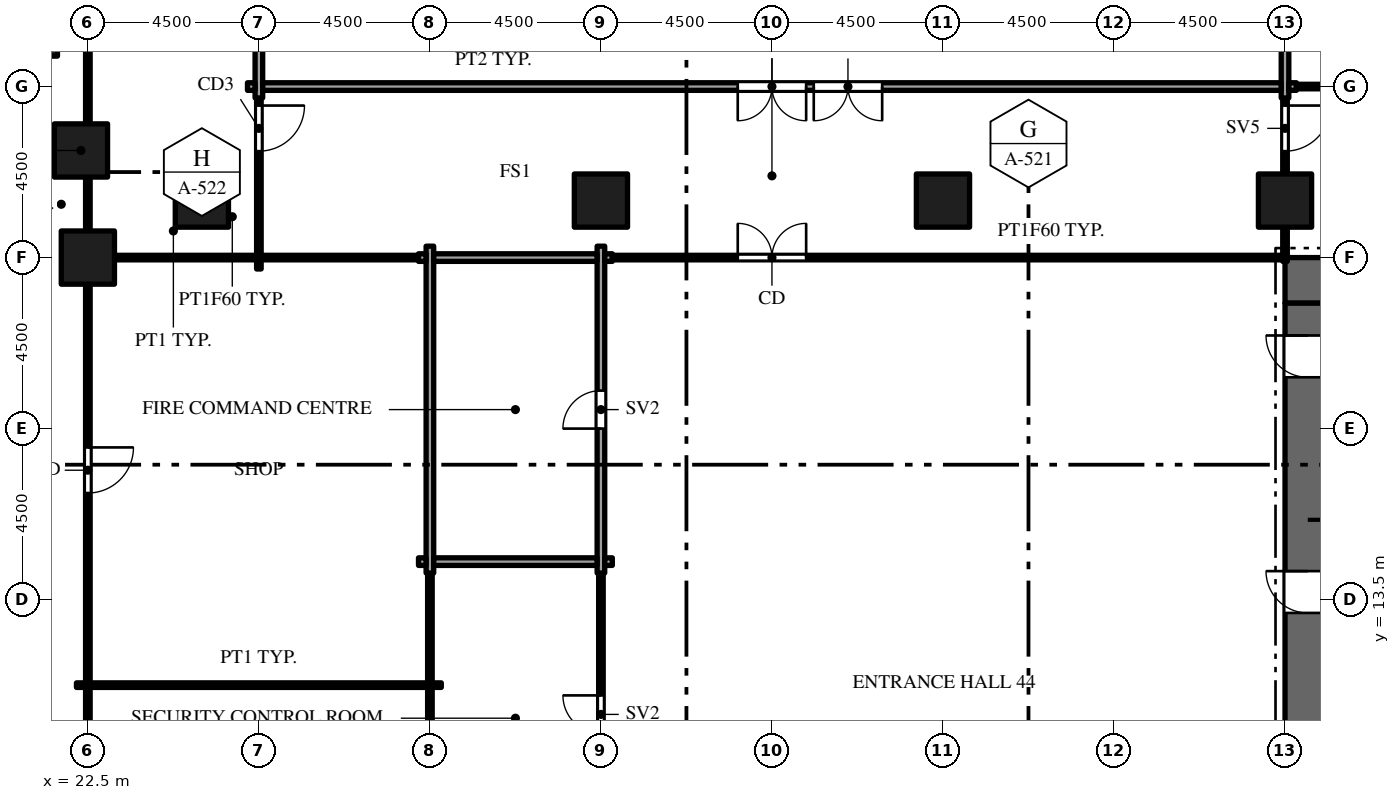
"""IFC4 building model, lengths in metres.
Left out: names, types, materials, properties, quantities, classifications, styles, units other than length and angle.
Written with IfcOpenShell. Run it as: python <this file> out.ifc"""

import sys

from ifc_helpers import new_model, si_unit, direction, frame, frame_2d, origin, origin_2d, place, context, subcontext, project, spatial, rectangle, hollow_rectangle, extrude, element, fill, save


model = new_model("IFC4")
c1 = context("Model", 3, precision=1e-05, world=origin(), true_north=direction((0.0, 1.0)))
c2 = subcontext(c1, "Body", "Model", "MODEL_VIEW")
j1 = project(units=[si_unit("LENGTHUNIT", "METRE"), si_unit("PLANEANGLEUNIT", "RADIAN")], contexts=[c1])
p1 = place(None, origin())
s1 = spatial("IfcSite", under=j1, at=p1, CompositionType="ELEMENT")
p2 = place(p1, origin())
s2 = spatial("IfcBuilding", under=s1, at=p2, CompositionType="ELEMENT")
p3 = place(p2, origin())
s3 = spatial("IfcBuildingStorey", under=s2, at=p3, CompositionType="ELEMENT", Elevation=0.0)
p4 = place(p3, frame((54.0, 21.9, -0.3), z_axis=(0.0, 0.0, 1.0), x_axis=(1.0, 0.0, 0.0)))
e1 = element("IfcWall", 1, at=p4, inside=s3, PredefinedType="SHEAR", context=c2, shape_type="SweptSolid", body=[
    extrude(rectangle(XDim=13.5, YDim=1.2, at=frame_2d((6.75, 0.0))), origin(), (0.0, 0.0, 1.0), 8.15),
])
p5 = place(p3, frame((54.6, 1.2, -0.3), z_axis=(0.0, 0.0, 1.0), x_axis=(0.0, 1.0, 0.0)))
e2 = element("IfcWall", 2, at=p5, inside=s3, PredefinedType="SHEAR", context=c2, shape_type="SweptSolid", body=[
    extrude(rectangle(XDim=20.1, YDim=1.2, at=frame_2d((10.05, 0.0))), origin(), (0.0, 0.0, 1.0), 8.15),
])
p6 = place(p5, frame((5.9, 0.0, 0.3)))
e3 = element("IfcOpeningElement", 3, at=p6, cuts=e2, PredefinedType="OPENING", context=c2, shape_type="SweptSolid", body=[
    extrude(rectangle(XDim=1.8, YDim=2.1, at=frame_2d((0.9, 1.05))), frame((0.0, 0.61, 0.0), z_axis=(0.0, -1.0, 0.0), x_axis=(1.0, 0.0, 0.0)), (0.0, 0.0, 1.0), 1.22),
])
p7 = place(p5, frame((11.95, 0.0, 0.3)))
e4 = element("IfcOpeningElement", 4, at=p7, cuts=e2, PredefinedType="OPENING", context=c2, shape_type="SweptSolid", body=[
    extrude(rectangle(XDim=1.1, YDim=2.1, at=frame_2d((0.55, 1.05))), frame((0.0, 0.61, 0.0), z_axis=(0.0, -1.0, 0.0), x_axis=(1.0, 0.0, 0.0)), (0.0, 0.0, 1.0), 1.22),
])
p8 = place(p5, frame((0.95, 0.0, 0.3)))
e5 = element("IfcOpeningElement", 5, at=p8, cuts=e2, PredefinedType="OPENING", context=c2, shape_type="SweptSolid", body=[
    extrude(rectangle(XDim=1.1, YDim=2.1, at=frame_2d((0.55, 1.05))), frame((0.0, 0.61, 0.0), z_axis=(0.0, -1.0, 0.0), x_axis=(1.0, 0.0, 0.0)), (0.0, 0.0, 1.0), 1.22),
])
p9 = place(p5, frame((18.15, 0.0, 0.3)))
e6 = element("IfcOpeningElement", 6, at=p9, cuts=e2, PredefinedType="OPENING", context=c2, shape_type="SweptSolid", body=[
    extrude(rectangle(XDim=1.1, YDim=2.1, at=frame_2d((0.55, 1.05))), frame((0.0, 0.61, 0.0), z_axis=(0.0, -1.0, 0.0), x_axis=(1.0, 0.0, 0.0)), (0.0, 0.0, 1.0), 1.22),
])
for number, where, z_axis, x_axis in (
    (7, (21.0, 28.5, -0.3), (0.0, 0.0, 1.0), (1.0, 0.0, 0.0)),
    (8, (22.318, 25.318, -0.3), (0.0, 0.0, 1.0), (1.0, 0.0, 0.0)),
    (9, (22.5, 22.5, -0.3), (0.0, 0.0, 1.0), (1.0, 0.0, 0.0)),
    (10, (25.5, 24.0, -0.3), (0.0, 0.0, 1.0), (1.0, 0.0, 0.0)),
    (11, (36.0, 24.0, -0.3), (0.0, 0.0, 1.0), (1.0, 0.0, 0.0)),
    (12, (45.0, 24.0, -0.3), (0.0, 0.0, 1.0), (1.0, 0.0, 0.0)),
    (13, (54.0, 24.0, -0.3), (0.0, 0.0, 1.0), (1.0, 0.0, 0.0)),
):
    element("IfcColumn", number, at=place(p3, frame(where, z_axis=z_axis, x_axis=x_axis)), inside=s3, PredefinedType="COLUMN", context=c2, shape_type="SweptSolid", body=[
        extrude(hollow_rectangle(XDim=1.4, YDim=1.4, WallThickness=0.08, at=origin_2d()), origin(), (0.0, 0.0, 1.0), 8.05),
    ])
p10 = place(p3, frame((22.5, 0.15, 0.0), z_axis=(0.0, 0.0, 1.0), x_axis=(0.0, 1.0, 0.0)))
e14 = element("IfcWall", 14, at=p10, inside=s3, PredefinedType="PARTITIONING", context=c2, shape_type="SweptSolid", body=[
    extrude(rectangle(XDim=32.85, YDim=0.12, at=frame_2d((16.425, 0.0))), origin(), (0.0, 0.0, 1.0), 6.759),
])
p11 = place(p10, frame((5.35, 0.0, 0.0)))
e15 = element("IfcOpeningElement", 15, at=p11, cuts=e14, PredefinedType="OPENING", context=c2, shape_type="SweptSolid", body=[
    extrude(rectangle(XDim=1.2, YDim=2.1, at=frame_2d((0.6, 1.05))), frame((0.0, 0.07, 0.0), z_axis=(0.0, -1.0, 0.0), x_axis=(1.0, 0.0, 0.0)), (0.0, 0.0, 1.0), 0.14),
])
p12 = place(p10, frame((16.155, 0.0, 0.0)))
e16 = element("IfcOpeningElement", 16, at=p12, cuts=e14, PredefinedType="OPENING", context=c2, shape_type="SweptSolid", body=[
    extrude(rectangle(XDim=1.2, YDim=2.1, at=frame_2d((0.6, 1.05))), frame((0.0, 0.07, 0.0), z_axis=(0.0, -1.0, 0.0), x_axis=(1.0, 0.0, 0.0)), (0.0, 0.0, 1.0), 0.14),
])
p13 = place(p10, frame((30.15, 0.0, 0.0)))
e17 = element("IfcOpeningElement", 17, at=p13, cuts=e14, PredefinedType="OPENING", context=c2, shape_type="SweptSolid", body=[
    extrude(rectangle(XDim=1.8, YDim=2.1, at=frame_2d((0.9, 1.05))), frame((0.0, 0.07, 0.0), z_axis=(0.0, -1.0, 0.0), x_axis=(1.0, 0.0, 0.0)), (0.0, 0.0, 1.0), 0.14),
])
p14 = place(p3, frame((27.0, 22.2, 0.0), z_axis=(0.0, 0.0, 1.0), x_axis=(0.0, 1.0, 0.0)))
e18 = element("IfcWall", 18, at=p14, inside=s3, PredefinedType="PARTITIONING", context=c2, shape_type="SweptSolid", body=[
    extrude(rectangle(XDim=4.5, YDim=0.12, at=frame_2d((2.25, 0.0))), origin(), (0.0, 0.0, 1.0), 6.5),
])
p15 = place(p14, frame((3.1, 0.0, 0.0)))
e19 = element("IfcOpeningElement", 19, at=p15, cuts=e18, PredefinedType="OPENING", context=c2, shape_type="SweptSolid", body=[
    extrude(rectangle(XDim=1.2, YDim=2.1, at=frame_2d((0.6, 1.05))), frame((0.0, 0.07, 0.0), z_axis=(0.0, -1.0, 0.0), x_axis=(1.0, 0.0, 0.0)), (0.0, 0.0, 1.0), 0.14),
])
p16 = place(p3, frame((27.0, 26.7, 0.0), z_axis=(0.0, 0.0, 1.0), x_axis=(0.0, 1.0, 0.0)))
e20 = element("IfcWall", 20, at=p16, inside=s3, PredefinedType="PARTITIONING", context=c2, shape_type="SweptSolid", body=[
    extrude(rectangle(XDim=17.1, YDim=0.2, at=frame_2d((8.55, 0.0))), origin(), (0.0, 0.0, 1.0), 6.66),
])
p17 = place(p3, frame((31.5, 0.15, 0.0), z_axis=(0.0, 0.0, 1.0), x_axis=(0.0, 1.0, 0.0)))
e21 = element("IfcWall", 21, at=p17, inside=s3, PredefinedType="PARTITIONING", context=c2, shape_type="SweptSolid", body=[
    extrude(rectangle(XDim=14.05, YDim=0.12, at=frame_2d((7.025, 0.0))), origin(), (0.0, 0.0, 1.0), 6.759),
])
p18 = place(p3, frame((31.5, 14.2, 0.0), z_axis=(0.0, 0.0, 1.0), x_axis=(0.0, 1.0, 0.0)))
e22 = element("IfcWall", 22, at=p18, inside=s3, PredefinedType="PARTITIONING", context=c2, shape_type="SweptSolid", body=[
    extrude(rectangle(XDim=8.6, YDim=0.2, at=frame_2d((4.3, 0.0))), origin(), (0.0, 0.0, 1.0), 6.759),
])
p19 = place(p3, frame((36.0, 0.15, 0.0), z_axis=(0.0, 0.0, 1.0), x_axis=(0.0, 1.0, 0.0)))
e23 = element("IfcWall", 23, at=p19, inside=s3, PredefinedType="PARTITIONING", context=c2, shape_type="SweptSolid", body=[
    extrude(rectangle(XDim=14.05, YDim=0.12, at=frame_2d((7.025, 0.0))), origin(), (0.0, 0.0, 1.0), 6.759),
])
p20 = place(p19, frame((9.83, 0.0, 0.0)))
e24 = element("IfcOpeningElement", 24, at=p20, cuts=e23, PredefinedType="OPENING", context=c2, shape_type="SweptSolid", body=[
    extrude(rectangle(XDim=1.0, YDim=2.1, at=frame_2d((0.5, 1.05))), frame((0.0, 0.07, 0.0), z_axis=(0.0, -1.0, 0.0), x_axis=(1.0, 0.0, 0.0)), (0.0, 0.0, 1.0), 0.14),
])
p21 = place(p19, frame((0.455, 0.0, 0.0)))
e25 = element("IfcOpeningElement", 25, at=p21, cuts=e23, PredefinedType="OPENING", context=c2, shape_type="SweptSolid", body=[
    extrude(rectangle(XDim=0.9, YDim=2.1, at=frame_2d((0.45, 1.05))), frame((0.0, 0.07, 0.0), z_axis=(0.0, -1.0, 0.0), x_axis=(1.0, 0.0, 0.0)), (0.0, 0.0, 1.0), 0.14),
])
p22 = place(p19, frame((2.4, 0.0, 0.0)))
e26 = element("IfcOpeningElement", 26, at=p22, cuts=e23, PredefinedType="OPENING", context=c2, shape_type="SweptSolid", body=[
    extrude(rectangle(XDim=0.9, YDim=2.1, at=frame_2d((0.45, 1.05))), frame((0.0, 0.07, 0.0), z_axis=(0.0, -1.0, 0.0), x_axis=(1.0, 0.0, 0.0)), (0.0, 0.0, 1.0), 0.14),
])
p23 = place(p19, frame((4.6, 0.0, 0.0)))
e27 = element("IfcOpeningElement", 27, at=p23, cuts=e23, PredefinedType="OPENING", context=c2, shape_type="SweptSolid", body=[
    extrude(rectangle(XDim=1.0, YDim=2.1, at=frame_2d((0.5, 1.05))), frame((0.0, 0.07, 0.0), z_axis=(0.0, -1.0, 0.0), x_axis=(1.0, 0.0, 0.0)), (0.0, 0.0, 1.0), 0.14),
])
p24 = place(p3, frame((36.0, 14.2, 0.0), z_axis=(0.0, 0.0, 1.0), x_axis=(0.0, 1.0, 0.0)))
e28 = element("IfcWall", 28, at=p24, inside=s3, PredefinedType="PARTITIONING", context=c2, shape_type="SweptSolid", body=[
    extrude(rectangle(XDim=8.6, YDim=0.2, at=frame_2d((4.3, 0.0))), origin(), (0.0, 0.0, 1.0), 6.759),
])
p25 = place(p24, frame((3.8, 0.0, 0.0)))
e29 = element("IfcOpeningElement", 29, at=p25, cuts=e28, PredefinedType="OPENING", context=c2, shape_type="SweptSolid", body=[
    extrude(rectangle(XDim=1.0, YDim=2.1, at=frame_2d((0.5, 1.05))), frame((0.0, 0.11, 0.0), z_axis=(0.0, -1.0, 0.0), x_axis=(1.0, 0.0, 0.0)), (0.0, 0.0, 1.0), 0.22),
])
p26 = place(p3, frame((54.0, 22.4, 0.0), z_axis=(0.0, 0.0, 1.0), x_axis=(0.0, 1.0, 0.0)))
e30 = element("IfcWall", 30, at=p26, inside=s3, PredefinedType="PARTITIONING", context=c2, shape_type="SweptSolid", body=[
    extrude(rectangle(XDim=4.3, YDim=0.12, at=frame_2d((2.15, 0.0))), origin(), (0.0, 0.0, 1.0), 6.66),
])
p27 = place(p26, frame((2.9, 0.0, 0.0)))
e31 = element("IfcOpeningElement", 31, at=p27, cuts=e30, PredefinedType="OPENING", context=c2, shape_type="SweptSolid", body=[
    extrude(rectangle(XDim=1.2, YDim=2.1, at=frame_2d((0.6, 1.05))), frame((0.0, 0.07, 0.0), z_axis=(0.0, -1.0, 0.0), x_axis=(1.0, 0.0, 0.0)), (0.0, 0.0, 1.0), 0.14),
])
p28 = place(p3, frame((54.0, 26.7, 0.0), z_axis=(0.0, 0.0, 1.0), x_axis=(0.0, 1.0, 0.0)))
e32 = element("IfcWall", 32, at=p28, inside=s3, PredefinedType="PARTITIONING", context=c2, shape_type="SweptSolid", body=[
    extrude(rectangle(XDim=17.1, YDim=0.2, at=frame_2d((8.55, 0.0))), origin(), (0.0, 0.0, 1.0), 6.66),
])
p29 = place(p28, frame((7.65, 0.0, 0.0)))
e33 = element("IfcOpeningElement", 33, at=p29, cuts=e32, PredefinedType="OPENING", context=c2, shape_type="SweptSolid", body=[
    extrude(rectangle(XDim=1.8, YDim=2.1, at=frame_2d((0.9, 1.05))), frame((0.0, 0.11, 0.0), z_axis=(0.0, -1.0, 0.0), x_axis=(1.0, 0.0, 0.0)), (0.0, 0.0, 1.0), 0.22),
])
p30 = place(p3, frame((22.2, 11.25, 0.0), z_axis=(0.0, 0.0, 1.0), x_axis=(1.0, 0.0, 0.0)))
e34 = element("IfcWall", 34, at=p30, inside=s3, PredefinedType="PARTITIONING", context=c2, shape_type="SweptSolid", body=[
    extrude(rectangle(XDim=0.24, YDim=0.12, at=frame_2d((0.12, 0.0))), origin(), (0.0, 0.0, 1.0), 6.759),
])
p31 = place(p3, frame((22.56, 11.25, 0.0), z_axis=(0.0, 0.0, 1.0), x_axis=(1.0, 0.0, 0.0)))
e35 = element("IfcWall", 35, at=p31, inside=s3, PredefinedType="PARTITIONING", context=c2, shape_type="SweptSolid", body=[
    extrude(rectangle(XDim=8.88, YDim=0.12, at=frame_2d((4.44, 0.0))), origin(), (0.0, 0.0, 1.0), 6.66),
])
p32 = place(p3, frame((31.56, 11.25, 0.0), z_axis=(0.0, 0.0, 1.0), x_axis=(1.0, 0.0, 0.0)))
e36 = element("IfcWall", 36, at=p32, inside=s3, PredefinedType="PARTITIONING", context=c2, shape_type="SweptSolid", body=[
    extrude(rectangle(XDim=0.24, YDim=0.12, at=frame_2d((0.12, 0.0))), origin(), (0.0, 0.0, 1.0), 6.759),
])
p33 = place(p3, frame((31.2, 14.5, 0.0), z_axis=(0.0, 0.0, 1.0), x_axis=(1.0, 0.0, 0.0)))
e37 = element("IfcWall", 37, at=p33, inside=s3, PredefinedType="PARTITIONING", context=c2, shape_type="SweptSolid", body=[
    extrude(rectangle(XDim=0.2, YDim=0.2, at=frame_2d((0.1, 0.0))), origin(), (0.0, 0.0, 1.0), 6.759),
])
p34 = place(p3, frame((31.6, 14.5, 0.0), z_axis=(0.0, 0.0, 1.0), x_axis=(1.0, 0.0, 0.0)))
e38 = element("IfcWall", 38, at=p34, inside=s3, PredefinedType="PARTITIONING", context=c2, shape_type="SweptSolid", body=[
    extrude(rectangle(XDim=4.3, YDim=0.2, at=frame_2d((2.15, 0.0))), origin(), (0.0, 0.0, 1.0), 6.66),
])
p35 = place(p3, frame((36.1, 14.5, 0.0), z_axis=(0.0, 0.0, 1.0), x_axis=(1.0, 0.0, 0.0)))
e39 = element("IfcWall", 39, at=p35, inside=s3, PredefinedType="PARTITIONING", context=c2, shape_type="SweptSolid", body=[
    extrude(rectangle(XDim=0.2, YDim=0.2, at=frame_2d((0.1, 0.0))), origin(), (0.0, 0.0, 1.0), 6.759),
])
p36 = place(p3, frame((22.2, 22.5, 0.0), z_axis=(0.0, 0.0, 1.0), x_axis=(1.0, 0.0, 0.0)))
e40 = element("IfcWall", 40, at=p36, inside=s3, PredefinedType="PARTITIONING", context=c2, shape_type="SweptSolid", body=[
    extrude(rectangle(XDim=0.24, YDim=0.12, at=frame_2d((0.12, 0.0))), origin(), (0.0, 0.0, 1.0), 7.75),
])
p37 = place(p3, frame((22.56, 22.5, 0.0), z_axis=(0.0, 0.0, 1.0), x_axis=(1.0, 0.0, 0.0)))
e41 = element("IfcWall", 41, at=p37, inside=s3, PredefinedType="PARTITIONING", context=c2, shape_type="SweptSolid", body=[
    extrude(rectangle(XDim=4.38, YDim=0.12, at=frame_2d((2.19, 0.0))), origin(), (0.0, 0.0, 1.0), 6.66),
])
p38 = place(p3, frame((27.06, 22.5, 0.0), z_axis=(0.0, 0.0, 1.0), x_axis=(1.0, 0.0, 0.0)))
e42 = element("IfcWall", 42, at=p38, inside=s3, PredefinedType="PARTITIONING", context=c2, shape_type="SweptSolid", body=[
    extrude(rectangle(XDim=4.14, YDim=0.12, at=frame_2d((2.07, 0.0))), origin(), (0.0, 0.0, 1.0), 6.66),
])
p39 = place(p3, frame((31.2, 22.5, 0.0), z_axis=(0.0, 0.0, 1.0), x_axis=(1.0, 0.0, 0.0)))
e43 = element("IfcWall", 43, at=p39, inside=s3, PredefinedType="PARTITIONING", context=c2, shape_type="SweptSolid", body=[
    extrude(rectangle(XDim=0.2, YDim=0.2, at=frame_2d((0.1, 0.0))), origin(), (0.0, 0.0, 1.0), 6.759),
])
p40 = place(p3, frame((31.6, 22.5, 0.0), z_axis=(0.0, 0.0, 1.0), x_axis=(1.0, 0.0, 0.0)))
e44 = element("IfcWall", 44, at=p40, inside=s3, PredefinedType="PARTITIONING", context=c2, shape_type="SweptSolid", body=[
    extrude(rectangle(XDim=4.3, YDim=0.2, at=frame_2d((2.15, 0.0))), origin(), (0.0, 0.0, 1.0), 6.66),
])
p41 = place(p3, frame((36.1, 22.5, 0.0), z_axis=(0.0, 0.0, 1.0), x_axis=(1.0, 0.0, 0.0)))
e45 = element("IfcWall", 45, at=p41, inside=s3, PredefinedType="PARTITIONING", context=c2, shape_type="SweptSolid", body=[
    extrude(rectangle(XDim=0.2, YDim=0.2, at=frame_2d((0.1, 0.0))), origin(), (0.0, 0.0, 1.0), 6.759),
])
p42 = place(p3, frame((36.3, 22.5, 0.0), z_axis=(0.0, 0.0, 1.0), x_axis=(1.0, 0.0, 0.0)))
e46 = element("IfcWall", 46, at=p42, inside=s3, PredefinedType="PARTITIONING", context=c2, shape_type="SweptSolid", body=[
    extrude(rectangle(XDim=17.64, YDim=0.12, at=frame_2d((8.82, 0.0))), origin(), (0.0, 0.0, 1.0), 6.66),
])
p43 = place(p42, frame((3.3, 0.0, 0.0)))
e47 = element("IfcOpeningElement", 47, at=p43, cuts=e46, PredefinedType="OPENING", context=c2, shape_type="SweptSolid", body=[
    extrude(rectangle(XDim=1.8, YDim=2.1, at=frame_2d((0.9, 1.05))), frame((0.0, 0.07, 0.0), z_axis=(0.0, -1.0, 0.0), x_axis=(1.0, 0.0, 0.0)), (0.0, 0.0, 1.0), 0.14),
])
p44 = place(p3, frame((26.7, 27.0, 0.0), z_axis=(0.0, 0.0, 1.0), x_axis=(1.0, 0.0, 0.0)))
e48 = element("IfcWall", 48, at=p44, inside=s3, PredefinedType="PARTITIONING", context=c2, shape_type="SweptSolid", body=[
    extrude(rectangle(XDim=0.2, YDim=0.2, at=frame_2d((0.1, 0.0))), origin(), (0.0, 0.0, 1.0), 6.66),
])
p45 = place(p3, frame((27.1, 27.0, 0.0), z_axis=(0.0, 0.0, 1.0), x_axis=(1.0, 0.0, 0.0)))
e49 = element("IfcWall", 49, at=p45, inside=s3, PredefinedType="PARTITIONING", context=c2, shape_type="SweptSolid", body=[
    extrude(rectangle(XDim=26.8, YDim=0.2, at=frame_2d((13.4, 0.0))), origin(), (0.0, 0.0, 1.0), 6.66),
])
p46 = place(p45, frame((12.5, 0.0, 0.0)))
e50 = element("IfcOpeningElement", 50, at=p46, cuts=e49, PredefinedType="OPENING", context=c2, shape_type="SweptSolid", body=[
    extrude(rectangle(XDim=1.8, YDim=2.1, at=frame_2d((0.9, 1.05))), frame((0.0, 0.11, 0.0), z_axis=(0.0, -1.0, 0.0), x_axis=(1.0, 0.0, 0.0)), (0.0, 0.0, 1.0), 0.22),
])
p47 = place(p45, frame((14.5, 0.0, 0.0)))
e51 = element("IfcOpeningElement", 51, at=p47, cuts=e49, PredefinedType="OPENING", context=c2, shape_type="SweptSolid", body=[
    extrude(rectangle(XDim=1.8, YDim=2.1, at=frame_2d((0.9, 1.05))), frame((0.0, 0.11, 0.0), z_axis=(0.0, -1.0, 0.0), x_axis=(1.0, 0.0, 0.0)), (0.0, 0.0, 1.0), 0.22),
])
p48 = place(p3, frame((54.1, 27.0, 0.0), z_axis=(0.0, 0.0, 1.0), x_axis=(1.0, 0.0, 0.0)))
e52 = element("IfcWall", 52, at=p48, inside=s3, PredefinedType="PARTITIONING", context=c2, shape_type="SweptSolid", body=[
    extrude(rectangle(XDim=0.2, YDim=0.2, at=frame_2d((0.1, 0.0))), origin(), (0.0, 0.0, 1.0), 6.66),
])
p49 = place(p3, frame((54.3, 27.0, 0.0), z_axis=(0.0, 0.0, 1.0), x_axis=(1.0, 0.0, 0.0)))
e53 = element("IfcWall", 53, at=p49, inside=s3, PredefinedType="PARTITIONING", context=c2, shape_type="SweptSolid", body=[
    extrude(rectangle(XDim=13.05, YDim=0.12, at=frame_2d((6.525, 0.0))), origin(), (0.0, 0.0, 1.0), 6.66),
])
p50 = place(p49, frame((5.795, 0.0, 0.0)))
e54 = element("IfcOpeningElement", 54, at=p50, cuts=e53, PredefinedType="OPENING", context=c2, shape_type="SweptSolid", body=[
    extrude(rectangle(XDim=1.2, YDim=2.1, at=frame_2d((0.6, 1.05))), frame((0.0, 0.07, 0.0), z_axis=(0.0, -1.0, 0.0), x_axis=(1.0, 0.0, 0.0)), (0.0, 0.0, 1.0), 0.14),
])
p51 = place(p7, origin())
e55 = element("IfcDoor", 55, at=p51, inside=s3, OperationType="SINGLE_SWING_RIGHT", PredefinedType="DOOR", context=c2, shape_type="SweptSolid", body=[
    extrude(rectangle(XDim=1.1, YDim=2.1, at=frame_2d((0.55, 1.05))), frame((0.0, 0.025, 0.0), z_axis=(0.0, -1.0, 0.0), x_axis=(1.0, 0.0, 0.0)), (0.0, 0.0, 1.0), 0.05),
])
fill(e4, e55)
p52 = place(p9, origin())
e56 = element("IfcDoor", 56, at=p52, inside=s3, OperationType="SINGLE_SWING_RIGHT", PredefinedType="DOOR", context=c2, shape_type="SweptSolid", body=[
    extrude(rectangle(XDim=1.1, YDim=2.1, at=frame_2d((0.55, 1.05))), frame((0.0, 0.025, 0.0), z_axis=(0.0, -1.0, 0.0), x_axis=(1.0, 0.0, 0.0)), (0.0, 0.0, 1.0), 0.05),
])
fill(e6, e56)
p53 = place(p25, origin())
e57 = element("IfcDoor", 57, at=p53, inside=s3, OperationType="SINGLE_SWING_LEFT", PredefinedType="DOOR", context=c2, shape_type="SweptSolid", body=[
    extrude(rectangle(XDim=1.0, YDim=2.1, at=frame_2d((0.5, 1.05))), frame((0.0, 0.025, 0.0), z_axis=(0.0, -1.0, 0.0), x_axis=(1.0, 0.0, 0.0)), (0.0, 0.0, 1.0), 0.05),
])
fill(e29, e57)
p54 = place(p20, origin())
e58 = element("IfcDoor", 58, at=p54, inside=s3, OperationType="SINGLE_SWING_RIGHT", PredefinedType="DOOR", context=c2, shape_type="SweptSolid", body=[
    extrude(rectangle(XDim=1.0, YDim=2.1, at=frame_2d((0.5, 1.05))), frame((0.0, 0.025, 0.0), z_axis=(0.0, -1.0, 0.0), x_axis=(1.0, 0.0, 0.0)), (0.0, 0.0, 1.0), 0.05),
])
fill(e24, e58)
p55 = place(p12, origin())
e59 = element("IfcDoor", 59, at=p55, inside=s3, OperationType="SINGLE_SWING_RIGHT", PredefinedType="DOOR", context=c2, shape_type="SweptSolid", body=[
    extrude(rectangle(XDim=1.2, YDim=2.1, at=frame_2d((0.6, 1.05))), frame((0.0, 0.025, 0.0), z_axis=(0.0, -1.0, 0.0), x_axis=(1.0, 0.0, 0.0)), (0.0, 0.0, 1.0), 0.05),
])
fill(e16, e59)
p56 = place(p15, origin())
e60 = element("IfcDoor", 60, at=p56, inside=s3, OperationType="SINGLE_SWING_RIGHT", PredefinedType="DOOR", context=c2, shape_type="SweptSolid", body=[
    extrude(rectangle(XDim=1.2, YDim=2.1, at=frame_2d((0.6, 1.05))), frame((0.0, 0.025, 0.0), z_axis=(0.0, -1.0, 0.0), x_axis=(1.0, 0.0, 0.0)), (0.0, 0.0, 1.0), 0.05),
])
fill(e19, e60)
p57 = place(p43, origin())
e61 = element("IfcDoor", 61, at=p57, inside=s3, OperationType="DOUBLE_DOOR_SINGLE_SWING", PredefinedType="DOOR", context=c2, shape_type="SweptSolid", body=[
    extrude(rectangle(XDim=1.8, YDim=2.1, at=frame_2d((0.9, 1.05))), frame((0.0, 0.025, 0.0), z_axis=(0.0, -1.0, 0.0), x_axis=(1.0, 0.0, 0.0)), (0.0, 0.0, 1.0), 0.05),
])
fill(e47, e61)
p58 = place(p46, origin())
e62 = element("IfcDoor", 62, at=p58, inside=s3, OperationType="DOUBLE_DOOR_SINGLE_SWING", PredefinedType="DOOR", context=c2, shape_type="SweptSolid", body=[
    extrude(rectangle(XDim=1.8, YDim=2.1, at=frame_2d((0.9, 1.05))), frame((0.0, 0.025, 0.0), z_axis=(0.0, -1.0, 0.0), x_axis=(1.0, 0.0, 0.0)), (0.0, 0.0, 1.0), 0.05),
])
fill(e50, e62)
p59 = place(p47, origin())
e63 = element("IfcDoor", 63, at=p59, inside=s3, OperationType="DOUBLE_DOOR_SINGLE_SWING", PredefinedType="DOOR", context=c2, shape_type="SweptSolid", body=[
    extrude(rectangle(XDim=1.8, YDim=2.1, at=frame_2d((0.9, 1.05))), frame((0.0, 0.025, 0.0), z_axis=(0.0, -1.0, 0.0), x_axis=(1.0, 0.0, 0.0)), (0.0, 0.0, 1.0), 0.05),
])
fill(e51, e63)
p60 = place(p27, origin())
e64 = element("IfcDoor", 64, at=p60, inside=s3, OperationType="SINGLE_SWING_RIGHT", PredefinedType="DOOR", context=c2, shape_type="SweptSolid", body=[
    extrude(rectangle(XDim=1.2, YDim=2.1, at=frame_2d((0.6, 1.05))), frame((0.0, 0.025, 0.0), z_axis=(0.0, -1.0, 0.0), x_axis=(1.0, 0.0, 0.0)), (0.0, 0.0, 1.0), 0.05),
])
fill(e31, e64)
save(model, sys.argv[1])
